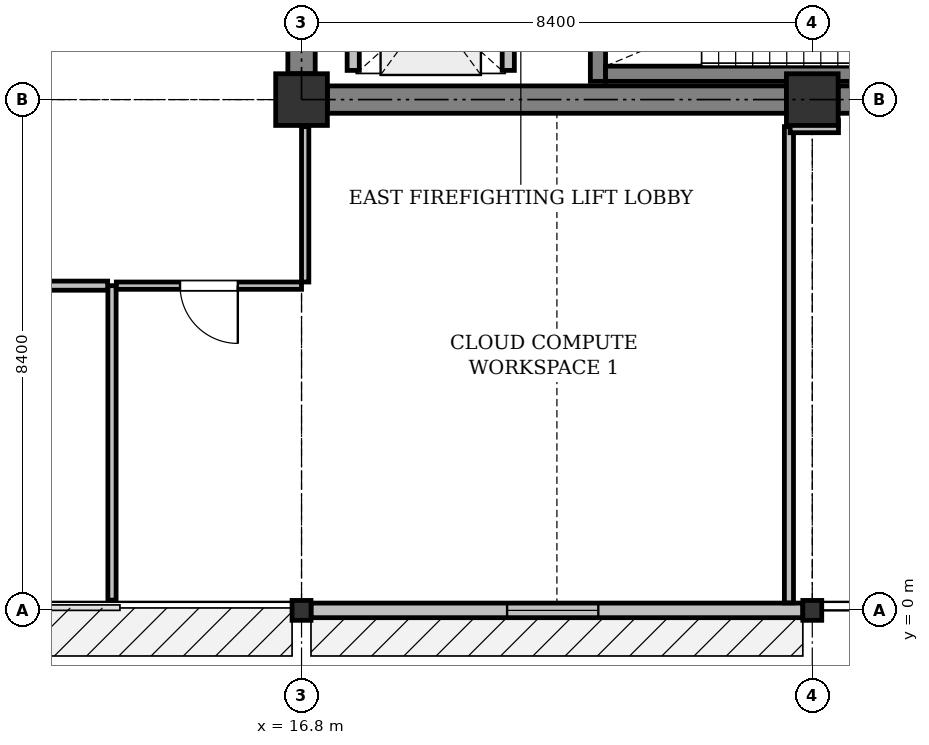
"""IFC4 building model, lengths in metres.
Left out: names, types, materials, properties, quantities, classifications, styles, units other than length and angle.
Written with IfcOpenShell. Run it as: python <this file> out.ifc"""

import sys

from ifc_helpers import new_model, si_unit, direction, frame, frame_2d, origin, origin_2d, place, context, subcontext, project, spatial, rectangle, i_section, extrude, element, fill, save


model = new_model("IFC4")
c1 = context("Model", 3, precision=1e-05, world=origin(), true_north=direction((0.0, 1.0)))
c2 = subcontext(c1, "Body", "Model", "MODEL_VIEW")
j1 = project(units=[si_unit("LENGTHUNIT", "METRE"), si_unit("PLANEANGLEUNIT", "RADIAN")], contexts=[c1])
p1 = place(None, origin())
s1 = spatial("IfcSite", under=j1, at=p1, CompositionType="ELEMENT")
p2 = place(p1, origin())
s2 = spatial("IfcBuilding", under=s1, at=p2, CompositionType="ELEMENT")
p3 = place(p2, frame((0.0, 0.0, 314.2)))
s3 = spatial("IfcBuildingStorey", under=s2, at=p3, CompositionType="ELEMENT", Elevation=314.2)
p4 = place(p3, frame((16.8, 0.0, 0.0), z_axis=(0.0, 0.0, 1.0), x_axis=(1.0, 0.0, 0.0)))
e1 = element("IfcColumn", 1, at=p4, inside=s3, PredefinedType="COLUMN", context=c2, shape_type="SweptSolid", body=[
    extrude(i_section(OverallWidth=0.311, OverallDepth=0.327, WebThickness=0.016, FlangeThickness=0.025, FilletRadius=0.017, at=origin_2d()), origin(), (0.0, 0.0, 1.0), 4.0),
])
p5 = place(p3, frame((16.8, 8.4, 0.0), z_axis=(0.0, 0.0, 1.0), x_axis=(1.0, 0.0, 0.0)))
e2 = element("IfcColumn", 2, at=p5, inside=s3, PredefinedType="COLUMN", context=c2, shape_type="SweptSolid", body=[
    extrude(rectangle(XDim=0.85, YDim=0.85, at=origin_2d()), origin(), (0.0, 0.0, 1.0), 4.0),
])
p6 = place(p3, frame((25.2, 0.0, 0.0), z_axis=(0.0, 0.0, 1.0), x_axis=(1.0, 0.0, 0.0)))
e3 = element("IfcColumn", 3, at=p6, inside=s3, PredefinedType="COLUMN", context=c2, shape_type="SweptSolid", body=[
    extrude(i_section(OverallWidth=0.311, OverallDepth=0.327, WebThickness=0.016, FlangeThickness=0.025, FilletRadius=0.017, at=origin_2d()), origin(), (0.0, 0.0, 1.0), 4.0),
])
p7 = place(p3, frame((25.2, 8.4, 0.0), z_axis=(0.0, 0.0, 1.0), x_axis=(1.0, 0.0, 0.0)))
e4 = element("IfcColumn", 4, at=p7, inside=s3, PredefinedType="COLUMN", context=c2, shape_type="SweptSolid", body=[
    extrude(rectangle(XDim=0.85, YDim=0.85, at=origin_2d()), origin(), (0.0, 0.0, 1.0), 4.0),
])
p8 = place(p3, frame((25.044, 0.0, 0.0), z_axis=(0.0, 0.0, 1.0), x_axis=(-1.0, 0.0, 0.0)))
e5 = element("IfcWall", 5, at=p8, inside=s3, PredefinedType="STANDARD", context=c2, shape_type="SweptSolid", body=[
    extrude(rectangle(XDim=8.089, YDim=0.24, at=frame_2d((4.044, 0.0))), origin(), (0.0, 0.0, 1.0), 3.475),
])
p9 = place(p8, frame((3.364, 0.0, 0.9)))
e6 = element("IfcOpeningElement", 6, at=p9, cuts=e5, PredefinedType="OPENING", context=c2, shape_type="SweptSolid", body=[
    extrude(rectangle(XDim=1.5, YDim=1.6, at=frame_2d((0.75, 0.8))), frame((0.0, 0.13, 0.0), z_axis=(0.0, -1.0, 0.0), x_axis=(1.0, 0.0, 0.0)), (0.0, 0.0, 1.0), 0.26),
])
p10 = place(p3, frame((17.225, 8.4, 0.0), z_axis=(0.0, 0.0, 1.0), x_axis=(1.0, 0.0, 0.0)))
e7 = element("IfcWall", 7, at=p10, inside=s3, PredefinedType="SHEAR", context=c2, shape_type="SweptSolid", body=[
    extrude(rectangle(XDim=7.55, YDim=0.45, at=frame_2d((3.775, 0.0))), origin(), (0.0, 0.0, 1.0), 3.725),
])
p11 = place(p3, frame((25.625, 8.4, 0.0), z_axis=(0.0, 0.0, 1.0), x_axis=(1.0, 0.0, 0.0)))
e8 = element("IfcWall", 8, at=p11, inside=s3, PredefinedType="SHEAR", context=c2, shape_type="SweptSolid", body=[
    extrude(rectangle(XDim=7.55, YDim=0.45, at=frame_2d((3.775, 0.0))), origin(), (0.0, 0.0, 1.0), 3.725),
])
p12 = place(p3, frame((16.8, 8.825, 0.0), z_axis=(0.0, 0.0, 1.0), x_axis=(0.0, 1.0, 0.0)))
e9 = element("IfcWall", 9, at=p12, inside=s3, PredefinedType="SHEAR", context=c2, shape_type="SweptSolid", body=[
    extrude(rectangle(XDim=7.55, YDim=0.45, at=frame_2d((3.775, 0.0))), origin(), (0.0, 0.0, 1.0), 3.725),
])
p13 = place(p12, frame((3.425, 0.0, 0.0)))
e10 = element("IfcOpeningElement", 10, at=p13, cuts=e9, PredefinedType="OPENING", context=c2, shape_type="SweptSolid", body=[
    extrude(rectangle(XDim=1.1, YDim=2.15, at=frame_2d((0.55, 1.075))), frame((0.0, 0.235, 0.0), z_axis=(0.0, -1.0, 0.0), x_axis=(1.0, 0.0, 0.0)), (0.0, 0.0, 1.0), 0.47),
])
p14 = place(p3, frame((21.675, 8.7, 0.0), z_axis=(0.0, 0.0, 1.0), x_axis=(0.0, 1.0, 0.0)))
e11 = element("IfcWall", 11, at=p14, inside=s3, PredefinedType="SHEAR", context=c2, shape_type="SweptSolid", body=[
    extrude(rectangle(XDim=3.75, YDim=0.25, at=frame_2d((1.875, 0.0))), origin(), (0.0, 0.0, 1.0), 3.725),
])
p15 = place(p3, frame((21.8, 8.825, 0.0), z_axis=(0.0, 0.0, 1.0), x_axis=(1.0, 0.0, 0.0)))
e12 = element("IfcWall", 12, at=p15, inside=s3, PredefinedType="SHEAR", context=c2, shape_type="SweptSolid", body=[
    extrude(rectangle(XDim=7.75, YDim=0.25, at=frame_2d((3.875, 0.0))), origin(), (0.0, 0.0, 1.0), 3.725),
])
for number, where, z_axis, x_axis in (
    (13, (20.2, 8.88, 0.0), (0.0, 0.0, 1.0), (0.0, 1.0, 0.0)),
    (14, (17.65, 8.88, 0.0), (0.0, 0.0, 1.0), (0.0, 1.0, 0.0)),
):
    element("IfcWall", number, at=place(p3, frame(where, z_axis=z_axis, x_axis=x_axis)), inside=s3, PredefinedType="PARTITIONING", context=c2, shape_type="SweptSolid", body=[
        extrude(rectangle(XDim=2.1, YDim=0.2, at=frame_2d((1.05, 0.0))), origin(), (0.0, 0.0, 1.0), 3.725),
    ])
p16 = place(p3, frame((7.774, 7.71, 0.0), z_axis=(0.0, 0.0, 1.0), x_axis=(1.0, 0.0, 0.0)))
e15 = element("IfcWall", 15, at=p16, inside=s3, PredefinedType="PARTITIONING", context=c2, shape_type="SweptSolid", body=[
    extrude(rectangle(XDim=6.316, YDim=0.15, at=frame_2d((3.158, 0.0))), origin(), (0.0, 0.0, 1.0), 3.319),
])
p17 = place(p16, frame((2.683, 0.0, 0.0)))
e16 = element("IfcOpeningElement", 16, at=p17, cuts=e15, PredefinedType="OPENING", context=c2, shape_type="SweptSolid", body=[
    extrude(rectangle(XDim=0.95, YDim=2.15, at=frame_2d((0.475, 1.075))), frame((0.0, 0.085, 0.0), z_axis=(0.0, -1.0, 0.0), x_axis=(1.0, 0.0, 0.0)), (0.0, 0.0, 1.0), 0.17),
])
p18 = place(p3, frame((14.09, 7.789, 0.0), z_axis=(0.0, 0.0, 1.0), x_axis=(0.0, 1.0, 0.0)))
e17 = element("IfcWall", 17, at=p18, inside=s3, PredefinedType="PARTITIONING", context=c2, shape_type="SweptSolid", body=[
    extrude(rectangle(XDim=2.351, YDim=0.12, at=frame_2d((1.175, 0.0))), origin(), (0.0, 0.0, 1.0), 3.271),
])
p19 = place(p3, frame((13.683, 0.169, 0.0), z_axis=(0.0, 0.0, 1.0), x_axis=(0.0, 1.0, 0.0)))
e18 = element("IfcWall", 18, at=p19, inside=s3, PredefinedType="PARTITIONING", context=c2, shape_type="SweptSolid", body=[
    extrude(rectangle(XDim=5.171, YDim=0.135, at=frame_2d((2.585, 0.0))), origin(), (0.0, 0.0, 1.0), 3.725),
])
p20 = place(p3, frame((13.611, 5.34, 0.0), z_axis=(0.0, 0.0, 1.0), x_axis=(-1.0, 0.0, 0.0)))
e19 = element("IfcWall", 19, at=p20, inside=s3, PredefinedType="PARTITIONING", context=c2, shape_type="SweptSolid", body=[
    extrude(rectangle(XDim=8.211, YDim=0.15, at=frame_2d((4.105, 0.0))), origin(), (0.0, 0.0, 1.0), 3.319),
])
p21 = place(p20, frame((3.631, 0.0, 0.0)))
e20 = element("IfcOpeningElement", 20, at=p21, cuts=e19, PredefinedType="OPENING", context=c2, shape_type="SweptSolid", body=[
    extrude(rectangle(XDim=0.95, YDim=2.15, at=frame_2d((0.475, 1.075))), frame((0.0, 0.085, 0.0), z_axis=(0.0, -1.0, 0.0), x_axis=(1.0, 0.0, 0.0)), (0.0, 0.0, 1.0), 0.17),
])
p22 = place(p3, frame((16.8, 5.34, 0.0), z_axis=(0.0, 0.0, 1.0), x_axis=(-1.0, 0.0, 0.0)))
e21 = element("IfcWall", 21, at=p22, inside=s3, PredefinedType="PARTITIONING", context=c2, shape_type="SweptSolid", body=[
    extrude(rectangle(XDim=3.046, YDim=0.12, at=frame_2d((1.523, 0.0))), origin(), (0.0, 0.0, 1.0), 3.319),
])
p23 = place(p22, frame((1.048, 0.0, 0.0)))
e22 = element("IfcOpeningElement", 22, at=p23, cuts=e21, PredefinedType="OPENING", context=c2, shape_type="SweptSolid", body=[
    extrude(rectangle(XDim=0.95, YDim=2.15, at=frame_2d((0.475, 1.075))), frame((0.0, 0.07, 0.0), z_axis=(0.0, -1.0, 0.0), x_axis=(1.0, 0.0, 0.0)), (0.0, 0.0, 1.0), 0.14),
])
p24 = place(p3, frame((24.816, 0.124, 0.0), z_axis=(0.0, 0.0, 1.0), x_axis=(0.0, 1.0, 0.0)))
e23 = element("IfcWall", 23, at=p24, inside=s3, PredefinedType="PARTITIONING", context=c2, shape_type="SweptSolid", body=[
    extrude(rectangle(XDim=7.831, YDim=0.15, at=frame_2d((3.916, 0.0))), origin(), (0.0, 0.0, 1.0), 3.725),
])
p25 = place(p3, frame((16.86, 7.955, 0.0), z_axis=(0.0, 0.0, 1.0), x_axis=(0.0, -1.0, 0.0)))
e24 = element("IfcWall", 24, at=p25, inside=s3, PredefinedType="PARTITIONING", context=c2, shape_type="SweptSolid", body=[
    extrude(rectangle(XDim=2.555, YDim=0.12, at=frame_2d((1.278, 0.0))), origin(), (0.0, 0.0, 1.0), 3.319),
])
p26 = place(p3, frame((25.631, 7.956, 0.0), z_axis=(0.0, 0.0, 1.0), x_axis=(-0.999999575533, -0.00092137553, 0.0)))
e25 = element("IfcWall", 25, at=p26, inside=s3, PredefinedType="PARTITIONING", context=c2, shape_type="SweptSolid", body=[
    extrude(rectangle(XDim=0.795, YDim=0.2, at=frame_2d((0.397, 0.0))), origin(), (0.0, 0.0, 1.0), 3.319),
])
p27 = place(p9, origin())
e26 = element("IfcWindow", 26, at=p27, inside=s3, PartitioningType="SINGLE_PANEL", PredefinedType="WINDOW", context=c2, shape_type="SweptSolid", body=[
    extrude(rectangle(XDim=1.5, YDim=1.6, at=frame_2d((0.75, 0.8))), frame((0.0, 0.03, 0.0), z_axis=(0.0, -1.0, 0.0), x_axis=(1.0, 0.0, 0.0)), (0.0, 0.0, 1.0), 0.06),
])
fill(e6, e26)
p28 = place(p23, origin())
e27 = element("IfcDoor", 27, at=p28, inside=s3, OperationType="SINGLE_SWING_LEFT", PredefinedType="DOOR", context=c2, shape_type="SweptSolid", body=[
    extrude(rectangle(XDim=0.95, YDim=2.15, at=frame_2d((0.475, 1.075))), frame((0.0, 0.025, 0.0), z_axis=(0.0, -1.0, 0.0), x_axis=(1.0, 0.0, 0.0)), (0.0, 0.0, 1.0), 0.05),
])
fill(e22, e27)
save(model, sys.argv[1])
